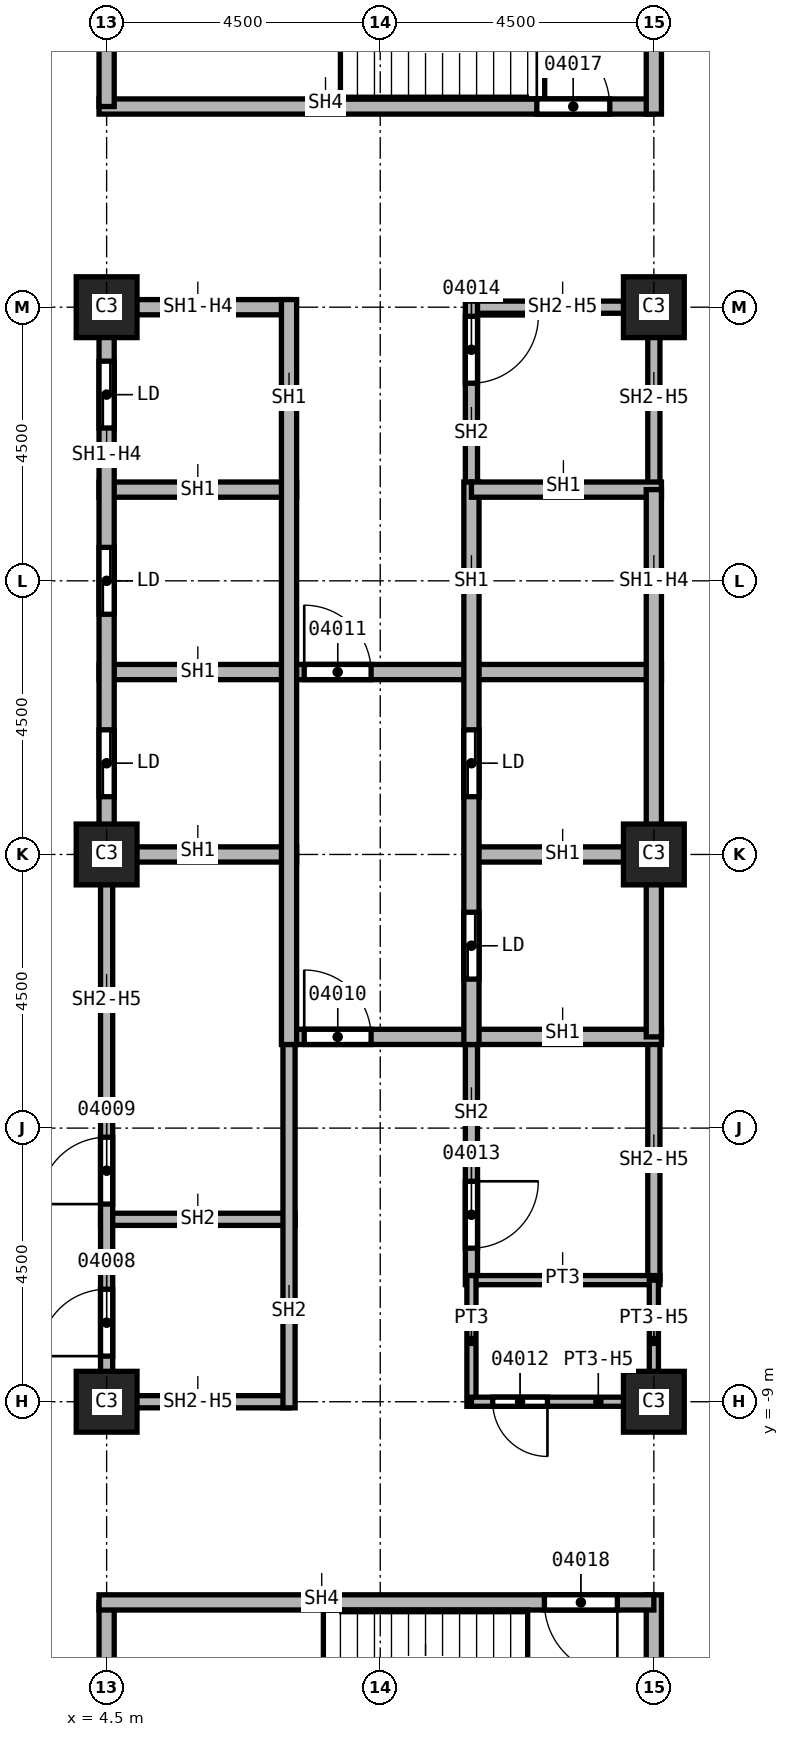
"""IFC4 building model, lengths in metres.
Left out: names, types, materials, properties, quantities, classifications, styles, units other than length and angle.
Written with IfcOpenShell. Run it as: python <this file> out.ifc"""

import sys

from ifc_helpers import new_model, si_unit, direction, frame, frame_2d, origin, origin_2d, place, context, subcontext, project, spatial, rectangle, extrude, element, fill, save


model = new_model("IFC4")
c1 = context("Model", 3, precision=1e-05, world=origin(), true_north=direction((0.0, 1.0)))
c2 = subcontext(c1, "Body", "Model", "MODEL_VIEW")
j1 = project(units=[si_unit("LENGTHUNIT", "METRE"), si_unit("PLANEANGLEUNIT", "RADIAN")], contexts=[c1])
p1 = place(None, origin())
s1 = spatial("IfcSite", under=j1, at=p1, CompositionType="ELEMENT")
p2 = place(p1, origin())
s2 = spatial("IfcBuilding", under=s1, at=p2, CompositionType="ELEMENT")
p3 = place(p2, frame((0.0, 0.0, 108.0)))
s3 = spatial("IfcBuildingStorey", under=s2, at=p3, CompositionType="ELEMENT", Elevation=108.0)
for number, where, z_axis, x_axis in (
    (1, (4.5, 0.0, 0.0), (0.0, 0.0, 1.0), (1.0, 0.0, 0.0)),
    (2, (4.5, 9.0, 0.0), (0.0, 0.0, 1.0), (1.0, 0.0, 0.0)),
    (3, (4.5, -9.0, 0.0), (0.0, 0.0, 1.0), (1.0, 0.0, 0.0)),
    (4, (13.5, 0.0, 0.0), (0.0, 0.0, 1.0), (1.0, 0.0, 0.0)),
    (5, (13.5, 9.0, 0.0), (0.0, 0.0, 1.0), (1.0, 0.0, 0.0)),
    (6, (13.5, -9.0, 0.0), (0.0, 0.0, 1.0), (1.0, 0.0, 0.0)),
):
    element("IfcColumn", number, at=place(p3, frame(where, z_axis=z_axis, x_axis=x_axis)), inside=s3, PredefinedType="COLUMN", context=c2, shape_type="SweptSolid", body=[
        extrude(rectangle(XDim=1.0, YDim=1.0, at=origin_2d()), origin(), (0.0, 0.0, 1.0), 3.7),
    ])
p4 = place(p3, frame((4.4, -6.0, 0.0), z_axis=(0.0, 0.0, 1.0), x_axis=(1.0, 0.0, 0.0)))
e7 = element("IfcWall", 7, at=p4, inside=s3, PredefinedType="SOLIDWALL", context=c2, shape_type="SweptSolid", body=[
    extrude(rectangle(XDim=3.2, YDim=0.2, at=frame_2d((1.6, 0.0))), origin(), (0.0, 0.0, 1.0), 3.7),
])
p5 = place(p3, frame((4.5, -9.1, 0.0), z_axis=(0.0, 0.0, 1.0), x_axis=(0.0, 1.0, 0.0)))
e8 = element("IfcWall", 8, at=p5, inside=s3, PredefinedType="SOLIDWALL", context=c2, shape_type="SweptSolid", body=[
    extrude(rectangle(XDim=9.1, YDim=0.2, at=frame_2d((4.55, 0.0))), origin(), (0.0, 0.0, 1.0), 2.938),
])
p6 = place(p5, frame((0.85, 0.0, 0.0)))
e9 = element("IfcOpeningElement", 9, at=p6, cuts=e8, PredefinedType="OPENING", context=c2, shape_type="SweptSolid", body=[
    extrude(rectangle(XDim=1.1, YDim=2.1, at=frame_2d((0.55, 1.05))), frame((0.0, 0.1, 0.0), z_axis=(0.0, -1.0, 0.0), x_axis=(1.0, 0.0, 0.0)), (0.0, 0.0, 1.0), 0.2),
])
p7 = place(p5, frame((3.35, 0.0, 0.0)))
e10 = element("IfcOpeningElement", 10, at=p7, cuts=e8, PredefinedType="OPENING", context=c2, shape_type="SweptSolid", body=[
    extrude(rectangle(XDim=1.1, YDim=2.1, at=frame_2d((0.55, 1.05))), frame((0.0, 0.1, 0.0), z_axis=(0.0, -1.0, 0.0), x_axis=(1.0, 0.0, 0.0)), (0.0, 0.0, 1.0), 0.2),
])
p8 = place(p3, frame((7.5, -9.0, 0.0), z_axis=(0.0, 0.0, 1.0), x_axis=(-1.0, 0.0, 0.0)))
e11 = element("IfcWall", 11, at=p8, inside=s3, PredefinedType="SOLIDWALL", context=c2, shape_type="SweptSolid", body=[
    extrude(rectangle(XDim=3.0, YDim=0.2, at=frame_2d((1.5, 0.0))), origin(), (0.0, 0.0, 1.0), 2.938),
])
p9 = place(p3, frame((7.5, -2.875, 0.0), z_axis=(0.0, 0.0, 1.0), x_axis=(0.0, -1.0, 0.0)))
e12 = element("IfcWall", 12, at=p9, inside=s3, PredefinedType="SOLIDWALL", context=c2, shape_type="SweptSolid", body=[
    extrude(rectangle(XDim=6.225, YDim=0.2, at=frame_2d((3.113, 0.0))), origin(), (0.0, 0.0, 1.0), 3.7),
])
p10 = place(p3, frame((10.5, -2.875, 0.0), z_axis=(0.0, 0.0, 1.0), x_axis=(0.0, -1.0, 0.0)))
e13 = element("IfcWall", 13, at=p10, inside=s3, PredefinedType="SOLIDWALL", context=c2, shape_type="SweptSolid", body=[
    extrude(rectangle(XDim=4.2, YDim=0.2, at=frame_2d((2.1, 0.0))), origin(), (0.0, 0.0, 1.0), 3.7),
])
p11 = place(p10, frame((2.5, 0.0, 0.0)))
e14 = element("IfcOpeningElement", 14, at=p11, cuts=e13, PredefinedType="OPENING", context=c2, shape_type="SweptSolid", body=[
    extrude(rectangle(XDim=1.1, YDim=2.1, at=frame_2d((0.55, 1.05))), frame((0.0, 0.1, 0.0), z_axis=(0.0, -1.0, 0.0), x_axis=(1.0, 0.0, 0.0)), (0.0, 0.0, 1.0), 0.2),
])
p12 = place(p3, frame((10.5, 9.0, 0.0), z_axis=(0.0, 0.0, 1.0), x_axis=(1.0, 0.0, 0.0)))
e15 = element("IfcWall", 15, at=p12, inside=s3, PredefinedType="SOLIDWALL", context=c2, shape_type="SweptSolid", body=[
    extrude(rectangle(XDim=3.0, YDim=0.2, at=frame_2d((1.5, 0.0))), origin(), (0.0, 0.0, 1.0), 2.938),
])
p13 = place(p3, frame((10.5, 9.1, 0.0), z_axis=(0.0, 0.0, 1.0), x_axis=(0.0, -1.0, 0.0)))
e16 = element("IfcWall", 16, at=p13, inside=s3, PredefinedType="SOLIDWALL", context=c2, shape_type="SweptSolid", body=[
    extrude(rectangle(XDim=3.225, YDim=0.2, at=frame_2d((1.613, 0.0))), origin(), (0.0, 0.0, 1.0), 3.7),
])
p14 = place(p13, frame((0.25, 0.0, 0.0)))
e17 = element("IfcOpeningElement", 17, at=p14, cuts=e16, PredefinedType="OPENING", context=c2, shape_type="SweptSolid", body=[
    extrude(rectangle(XDim=1.1, YDim=2.1, at=frame_2d((0.55, 1.05))), frame((0.0, 0.1, 0.0), z_axis=(0.0, -1.0, 0.0), x_axis=(1.0, 0.0, 0.0)), (0.0, 0.0, 1.0), 0.2),
])
p15 = place(p3, frame((13.5, -3.0, 0.0), z_axis=(0.0, 0.0, 1.0), x_axis=(0.0, -1.0, 0.0)))
e18 = element("IfcWall", 18, at=p15, inside=s3, PredefinedType="SOLIDWALL", context=c2, shape_type="SweptSolid", body=[
    extrude(rectangle(XDim=4.0, YDim=0.2, at=frame_2d((2.0, 0.0))), origin(), (0.0, 0.0, 1.0), 2.938),
])
p16 = place(p3, frame((13.5, 9.1, 0.0), z_axis=(0.0, 0.0, 1.0), x_axis=(0.0, -1.0, 0.0)))
e19 = element("IfcWall", 19, at=p16, inside=s3, PredefinedType="SOLIDWALL", context=c2, shape_type="SweptSolid", body=[
    extrude(rectangle(XDim=3.1, YDim=0.2, at=frame_2d((1.55, 0.0))), origin(), (0.0, 0.0, 1.0), 2.938),
])
p17 = place(p3, frame((4.375, 0.0, 0.0), z_axis=(0.0, 0.0, 1.0), x_axis=(1.0, 0.0, 0.0)))
e20 = element("IfcWall", 20, at=p17, inside=s3, PredefinedType="SOLIDWALL", context=c2, shape_type="SweptSolid", body=[
    extrude(rectangle(XDim=3.25, YDim=0.25, at=frame_2d((1.625, 0.0))), origin(), (0.0, 0.0, 1.0), 3.7),
])
p18 = place(p3, frame((4.375, 3.0, 0.0), z_axis=(0.0, 0.0, 1.0), x_axis=(1.0, 0.0, 0.0)))
e21 = element("IfcWall", 21, at=p18, inside=s3, PredefinedType="SOLIDWALL", context=c2, shape_type="SweptSolid", body=[
    extrude(rectangle(XDim=9.25, YDim=0.25, at=frame_2d((4.625, 0.0))), origin(), (0.0, 0.0, 1.0), 3.7),
])
p19 = place(p18, frame((3.375, 0.0, 0.0)))
e22 = element("IfcOpeningElement", 22, at=p19, cuts=e21, PredefinedType="OPENING", context=c2, shape_type="SweptSolid", body=[
    extrude(rectangle(XDim=1.1, YDim=2.1, at=frame_2d((0.55, 1.05))), frame((0.0, 0.125, 0.0), z_axis=(0.0, -1.0, 0.0), x_axis=(1.0, 0.0, 0.0)), (0.0, 0.0, 1.0), 0.25),
])
p20 = place(p3, frame((4.375, 6.0, 0.0), z_axis=(0.0, 0.0, 1.0), x_axis=(1.0, 0.0, 0.0)))
e23 = element("IfcWall", 23, at=p20, inside=s3, PredefinedType="SOLIDWALL", context=c2, shape_type="SweptSolid", body=[
    extrude(rectangle(XDim=3.25, YDim=0.25, at=frame_2d((1.625, 0.0))), origin(), (0.0, 0.0, 1.0), 3.7),
])
p21 = place(p3, frame((4.5, 0.0, 0.0), z_axis=(0.0, 0.0, 1.0), x_axis=(0.0, 1.0, 0.0)))
e24 = element("IfcWall", 24, at=p21, inside=s3, PredefinedType="SOLIDWALL", context=c2, shape_type="SweptSolid", body=[
    extrude(rectangle(XDim=9.125, YDim=0.25, at=frame_2d((4.562, 0.0))), origin(), (0.0, 0.0, 1.0), 2.938),
])
p22 = place(p21, frame((0.95, 0.0, 0.0)))
e25 = element("IfcOpeningElement", 25, at=p22, cuts=e24, PredefinedType="OPENING", context=c2, shape_type="SweptSolid", body=[
    extrude(rectangle(XDim=1.1, YDim=2.1, at=frame_2d((0.55, 1.05))), frame((0.0, 0.125, 0.0), z_axis=(0.0, -1.0, 0.0), x_axis=(1.0, 0.0, 0.0)), (0.0, 0.0, 1.0), 0.25),
])
p23 = place(p21, frame((3.95, 0.0, 0.0)))
e26 = element("IfcOpeningElement", 26, at=p23, cuts=e24, PredefinedType="OPENING", context=c2, shape_type="SweptSolid", body=[
    extrude(rectangle(XDim=1.1, YDim=2.1, at=frame_2d((0.55, 1.05))), frame((0.0, 0.125, 0.0), z_axis=(0.0, -1.0, 0.0), x_axis=(1.0, 0.0, 0.0)), (0.0, 0.0, 1.0), 0.25),
])
p24 = place(p21, frame((7.012, 0.0, 0.0)))
e27 = element("IfcOpeningElement", 27, at=p24, cuts=e24, PredefinedType="OPENING", context=c2, shape_type="SweptSolid", body=[
    extrude(rectangle(XDim=1.1, YDim=2.1, at=frame_2d((0.55, 1.05))), frame((0.0, 0.125, 0.0), z_axis=(0.0, -1.0, 0.0), x_axis=(1.0, 0.0, 0.0)), (0.0, 0.0, 1.0), 0.25),
])
p25 = place(p3, frame((4.5, 9.0, 0.0), z_axis=(0.0, 0.0, 1.0), x_axis=(1.0, 0.0, 0.0)))
e28 = element("IfcWall", 28, at=p25, inside=s3, PredefinedType="SOLIDWALL", context=c2, shape_type="SweptSolid", body=[
    extrude(rectangle(XDim=3.0, YDim=0.25, at=frame_2d((1.5, 0.0))), origin(), (0.0, 0.0, 1.0), 2.938),
])
p26 = place(p3, frame((7.5, -3.0, 0.0), z_axis=(0.0, 0.0, 1.0), x_axis=(1.0, 0.0, 0.0)))
e29 = element("IfcWall", 29, at=p26, inside=s3, PredefinedType="SOLIDWALL", context=c2, shape_type="SweptSolid", body=[
    extrude(rectangle(XDim=6.125, YDim=0.25, at=frame_2d((3.062, 0.0))), origin(), (0.0, 0.0, 1.0), 3.7),
])
p27 = place(p26, frame((0.25, 0.0, 0.0)))
e30 = element("IfcOpeningElement", 30, at=p27, cuts=e29, PredefinedType="OPENING", context=c2, shape_type="SweptSolid", body=[
    extrude(rectangle(XDim=1.1, YDim=2.1, at=frame_2d((0.55, 1.05))), frame((0.0, 0.125, 0.0), z_axis=(0.0, -1.0, 0.0), x_axis=(1.0, 0.0, 0.0)), (0.0, 0.0, 1.0), 0.25),
])
p28 = place(p3, frame((7.5, 9.125, 0.0), z_axis=(0.0, 0.0, 1.0), x_axis=(0.0, -1.0, 0.0)))
e31 = element("IfcWall", 31, at=p28, inside=s3, PredefinedType="SOLIDWALL", context=c2, shape_type="SweptSolid", body=[
    extrude(rectangle(XDim=12.25, YDim=0.25, at=frame_2d((6.125, 0.0))), origin(), (0.0, 0.0, 1.0), 3.7),
])
p29 = place(p3, frame((10.5, 0.0, 0.0), z_axis=(0.0, 0.0, 1.0), x_axis=(1.0, 0.0, 0.0)))
e32 = element("IfcWall", 32, at=p29, inside=s3, PredefinedType="SOLIDWALL", context=c2, shape_type="SweptSolid", body=[
    extrude(rectangle(XDim=3.125, YDim=0.25, at=frame_2d((1.562, 0.0))), origin(), (0.0, 0.0, 1.0), 3.7),
])
p30 = place(p3, frame((10.5, 6.125, 0.0), z_axis=(0.0, 0.0, 1.0), x_axis=(0.0, -1.0, 0.0)))
e33 = element("IfcWall", 33, at=p30, inside=s3, PredefinedType="SOLIDWALL", context=c2, shape_type="SweptSolid", body=[
    extrude(rectangle(XDim=9.25, YDim=0.25, at=frame_2d((4.625, 0.0))), origin(), (0.0, 0.0, 1.0), 3.7),
])
p31 = place(p30, frame((7.075, 0.0, 0.0)))
e34 = element("IfcOpeningElement", 34, at=p31, cuts=e33, PredefinedType="OPENING", context=c2, shape_type="SweptSolid", body=[
    extrude(rectangle(XDim=1.1, YDim=2.1, at=frame_2d((0.55, 1.05))), frame((0.0, 0.125, 0.0), z_axis=(0.0, -1.0, 0.0), x_axis=(1.0, 0.0, 0.0)), (0.0, 0.0, 1.0), 0.25),
])
p32 = place(p30, frame((4.075, 0.0, 0.0)))
e35 = element("IfcOpeningElement", 35, at=p32, cuts=e33, PredefinedType="OPENING", context=c2, shape_type="SweptSolid", body=[
    extrude(rectangle(XDim=1.1, YDim=2.1, at=frame_2d((0.55, 1.05))), frame((0.0, 0.125, 0.0), z_axis=(0.0, -1.0, 0.0), x_axis=(1.0, 0.0, 0.0)), (0.0, 0.0, 1.0), 0.25),
])
p33 = place(p3, frame((10.5, 6.0, 0.0), z_axis=(0.0, 0.0, 1.0), x_axis=(1.0, 0.0, 0.0)))
e36 = element("IfcWall", 36, at=p33, inside=s3, PredefinedType="SOLIDWALL", context=c2, shape_type="SweptSolid", body=[
    extrude(rectangle(XDim=3.125, YDim=0.25, at=frame_2d((1.562, 0.0))), origin(), (0.0, 0.0, 1.0), 3.7),
])
p34 = place(p3, frame((13.5, 6.0, 0.0), z_axis=(0.0, 0.0, 1.0), x_axis=(0.0, -1.0, 0.0)))
e37 = element("IfcWall", 37, at=p34, inside=s3, PredefinedType="SOLIDWALL", context=c2, shape_type="SweptSolid", body=[
    extrude(rectangle(XDim=9.0, YDim=0.25, at=frame_2d((4.5, 0.0))), origin(), (0.0, 0.0, 1.0), 2.938),
])
p35 = place(p3, frame((4.375, 12.3, 0.0), z_axis=(0.0, 0.0, 1.0), x_axis=(1.0, 0.0, 0.0)))
e38 = element("IfcWall", 38, at=p35, inside=s3, PredefinedType="SOLIDWALL", context=c2, shape_type="SweptSolid", body=[
    extrude(rectangle(XDim=9.125, YDim=0.25, at=frame_2d((4.562, 0.0))), origin(), (0.0, 0.0, 1.0), 3.7),
])
p36 = place(p35, frame((7.2, 0.0, 0.0)))
e39 = element("IfcOpeningElement", 39, at=p36, cuts=e38, PredefinedType="OPENING", context=c2, shape_type="SweptSolid", body=[
    extrude(rectangle(XDim=1.2, YDim=2.1, at=frame_2d((0.6, 1.05))), frame((0.0, 0.125, 0.0), z_axis=(0.0, -1.0, 0.0), x_axis=(1.0, 0.0, 0.0)), (0.0, 0.0, 1.0), 0.25),
])
for number, where, z_axis, x_axis in (
    (40, (4.5, -16.8, 0.0), (0.0, 0.0, 1.0), (0.0, 1.0, 0.0)),
    (41, (4.5, 12.3, 0.0), (0.0, 0.0, 1.0), (0.0, 1.0, 0.0)),
):
    element("IfcWall", number, at=place(p3, frame(where, z_axis=z_axis, x_axis=x_axis)), inside=s3, PredefinedType="SOLIDWALL", context=c2, shape_type="SweptSolid", body=[
        extrude(rectangle(XDim=4.5, YDim=0.25, at=frame_2d((2.25, 0.0))), origin(), (0.0, 0.0, 1.0), 3.7),
    ])
p37 = place(p3, frame((13.5, -16.925, 0.0), z_axis=(0.0, 0.0, 1.0), x_axis=(0.0, 1.0, 0.0)))
e42 = element("IfcWall", 42, at=p37, inside=s3, PredefinedType="SOLIDWALL", context=c2, shape_type="SweptSolid", body=[
    extrude(rectangle(XDim=4.75, YDim=0.25, at=frame_2d((2.375, 0.0))), origin(), (0.0, 0.0, 1.0), 3.7),
])
p38 = place(p3, frame((13.5, -12.3, 0.0), z_axis=(0.0, 0.0, 1.0), x_axis=(-1.0, 0.0, 0.0)))
e43 = element("IfcWall", 43, at=p38, inside=s3, PredefinedType="SOLIDWALL", context=c2, shape_type="SweptSolid", body=[
    extrude(rectangle(XDim=9.125, YDim=0.25, at=frame_2d((4.562, 0.0))), origin(), (0.0, 0.0, 1.0), 3.7),
])
p39 = place(p38, frame((0.6, 0.0, 0.0)))
e44 = element("IfcOpeningElement", 44, at=p39, cuts=e43, PredefinedType="OPENING", context=c2, shape_type="SweptSolid", body=[
    extrude(rectangle(XDim=1.2, YDim=2.1, at=frame_2d((0.6, 1.05))), frame((0.0, 0.125, 0.0), z_axis=(0.0, -1.0, 0.0), x_axis=(1.0, 0.0, 0.0)), (0.0, 0.0, 1.0), 0.25),
])
p40 = place(p3, frame((13.5, 12.175, 0.0), z_axis=(0.0, 0.0, 1.0), x_axis=(0.0, 1.0, 0.0)))
e45 = element("IfcWall", 45, at=p40, inside=s3, PredefinedType="SOLIDWALL", context=c2, shape_type="SweptSolid", body=[
    extrude(rectangle(XDim=4.75, YDim=0.25, at=frame_2d((2.375, 0.0))), origin(), (0.0, 0.0, 1.0), 3.7),
])
p41 = place(p3, frame((10.5, -7.0, 0.0), z_axis=(0.0, 0.0, 1.0), x_axis=(1.0, 0.0, 0.0)))
e46 = element("IfcWall", 46, at=p41, inside=s3, PredefinedType="PARTITIONING", context=c2, shape_type="SweptSolid", body=[
    extrude(rectangle(XDim=3.1, YDim=0.15, at=frame_2d((1.55, 0.0))), origin(), (0.0, 0.0, 1.0), 3.7),
])
p42 = place(p3, frame((10.5, -6.925, 0.0), z_axis=(0.0, 0.0, 1.0), x_axis=(0.0, -1.0, 0.0)))
e47 = element("IfcWall", 47, at=p42, inside=s3, PredefinedType="PARTITIONING", context=c2, shape_type="SweptSolid", body=[
    extrude(rectangle(XDim=2.15, YDim=0.15, at=frame_2d((1.075, 0.0))), origin(), (0.0, 0.0, 1.0), 3.7),
])
p43 = place(p3, frame((13.5, -9.0, 0.0), z_axis=(0.0, 0.0, 1.0), x_axis=(-1.0, 0.0, 0.0)))
e48 = element("IfcWall", 48, at=p43, inside=s3, PredefinedType="PARTITIONING", context=c2, shape_type="SweptSolid", body=[
    extrude(rectangle(XDim=3.0, YDim=0.15, at=frame_2d((1.5, 0.0))), origin(), (0.0, 0.0, 1.0), 2.938),
])
p44 = place(p43, frame((1.75, 0.0, 0.0)))
e49 = element("IfcOpeningElement", 49, at=p44, cuts=e48, PredefinedType="OPENING", context=c2, shape_type="SweptSolid", body=[
    extrude(rectangle(XDim=0.9, YDim=2.1, at=frame_2d((0.45, 1.05))), frame((0.0, 0.075, 0.0), z_axis=(0.0, -1.0, 0.0), x_axis=(1.0, 0.0, 0.0)), (0.0, 0.0, 1.0), 0.15),
])
p45 = place(p3, frame((13.5, -7.0, 0.0), z_axis=(0.0, 0.0, 1.0), x_axis=(0.0, -1.0, 0.0)))
e50 = element("IfcWall", 50, at=p45, inside=s3, PredefinedType="PARTITIONING", context=c2, shape_type="SweptSolid", body=[
    extrude(rectangle(XDim=2.075, YDim=0.15, at=frame_2d((1.038, 0.0))), origin(), (0.0, 0.0, 1.0), 2.938),
])
p46 = place(p6, origin())
e51 = element("IfcDoor", 51, at=p46, inside=s3, OperationType="SINGLE_SWING_LEFT", PredefinedType="DOOR", context=c2, shape_type="SweptSolid", body=[
    extrude(rectangle(XDim=1.1, YDim=2.1, at=frame_2d((0.55, 1.05))), frame((0.0, 0.025, 0.0), z_axis=(0.0, -1.0, 0.0), x_axis=(1.0, 0.0, 0.0)), (0.0, 0.0, 1.0), 0.05),
])
fill(e9, e51)
p47 = place(p7, origin())
e52 = element("IfcDoor", 52, at=p47, inside=s3, OperationType="SINGLE_SWING_RIGHT", PredefinedType="DOOR", context=c2, shape_type="SweptSolid", body=[
    extrude(rectangle(XDim=1.1, YDim=2.1, at=frame_2d((0.55, 1.05))), frame((0.0, 0.025, 0.0), z_axis=(0.0, -1.0, 0.0), x_axis=(1.0, 0.0, 0.0)), (0.0, 0.0, 1.0), 0.05),
])
fill(e10, e52)
p48 = place(p27, origin())
e53 = element("IfcDoor", 53, at=p48, inside=s3, OperationType="SINGLE_SWING_LEFT", PredefinedType="DOOR", context=c2, shape_type="SweptSolid", body=[
    extrude(rectangle(XDim=1.1, YDim=2.1, at=frame_2d((0.55, 1.05))), frame((0.0, 0.025, 0.0), z_axis=(0.0, -1.0, 0.0), x_axis=(1.0, 0.0, 0.0)), (0.0, 0.0, 1.0), 0.05),
])
fill(e30, e53)
p49 = place(p19, origin())
e54 = element("IfcDoor", 54, at=p49, inside=s3, OperationType="SINGLE_SWING_RIGHT", PredefinedType="DOOR", context=c2, shape_type="SweptSolid", body=[
    extrude(rectangle(XDim=1.1, YDim=2.1, at=frame_2d((0.55, 1.05))), frame((0.0, 0.025, 0.0), z_axis=(0.0, -1.0, 0.0), x_axis=(1.0, 0.0, 0.0)), (0.0, 0.0, 1.0), 0.05),
])
fill(e22, e54)
p50 = place(p44, origin())
e55 = element("IfcDoor", 55, at=p50, inside=s3, OperationType="SINGLE_SWING_LEFT", PredefinedType="DOOR", context=c2, shape_type="SweptSolid", body=[
    extrude(rectangle(XDim=0.9, YDim=2.1, at=frame_2d((0.45, 1.05))), frame((0.0, 0.025, 0.0), z_axis=(0.0, -1.0, 0.0), x_axis=(1.0, 0.0, 0.0)), (0.0, 0.0, 1.0), 0.05),
])
fill(e49, e55)
p51 = place(p11, origin())
e56 = element("IfcDoor", 56, at=p51, inside=s3, OperationType="SINGLE_SWING_RIGHT", PredefinedType="DOOR", context=c2, shape_type="SweptSolid", body=[
    extrude(rectangle(XDim=1.1, YDim=2.1, at=frame_2d((0.55, 1.05))), frame((0.0, 0.025, 0.0), z_axis=(0.0, -1.0, 0.0), x_axis=(1.0, 0.0, 0.0)), (0.0, 0.0, 1.0), 0.05),
])
fill(e14, e56)
p52 = place(p14, origin())
e57 = element("IfcDoor", 57, at=p52, inside=s3, OperationType="SINGLE_SWING_LEFT", PredefinedType="DOOR", context=c2, shape_type="SweptSolid", body=[
    extrude(rectangle(XDim=1.1, YDim=2.1, at=frame_2d((0.55, 1.05))), frame((0.0, 0.025, 0.0), z_axis=(0.0, -1.0, 0.0), x_axis=(1.0, 0.0, 0.0)), (0.0, 0.0, 1.0), 0.05),
])
fill(e17, e57)
p53 = place(p36, origin())
e58 = element("IfcDoor", 58, at=p53, inside=s3, OperationType="SINGLE_SWING_RIGHT", PredefinedType="DOOR", context=c2, shape_type="SweptSolid", body=[
    extrude(rectangle(XDim=1.2, YDim=2.1, at=frame_2d((0.6, 1.05))), frame((0.0, 0.025, 0.0), z_axis=(0.0, -1.0, 0.0), x_axis=(1.0, 0.0, 0.0)), (0.0, 0.0, 1.0), 0.05),
])
fill(e39, e58)
p54 = place(p39, origin())
e59 = element("IfcDoor", 59, at=p54, inside=s3, OperationType="SINGLE_SWING_LEFT", PredefinedType="DOOR", context=c2, shape_type="SweptSolid", body=[
    extrude(rectangle(XDim=1.2, YDim=2.1, at=frame_2d((0.6, 1.05))), frame((0.0, 0.025, 0.0), z_axis=(0.0, -1.0, 0.0), x_axis=(1.0, 0.0, 0.0)), (0.0, 0.0, 1.0), 0.05),
])
fill(e44, e59)
p55 = place(p22, origin())
e60 = element("IfcDoor", 60, at=p55, inside=s3, OperationType="SLIDING_TO_LEFT", PredefinedType="DOOR", context=c2, shape_type="SweptSolid", body=[
    extrude(rectangle(XDim=1.1, YDim=2.1, at=frame_2d((0.55, 1.05))), frame((0.0, 0.025, 0.0), z_axis=(0.0, -1.0, 0.0), x_axis=(1.0, 0.0, 0.0)), (0.0, 0.0, 1.0), 0.05),
])
fill(e25, e60)
p56 = place(p23, origin())
e61 = element("IfcDoor", 61, at=p56, inside=s3, OperationType="SLIDING_TO_LEFT", PredefinedType="DOOR", context=c2, shape_type="SweptSolid", body=[
    extrude(rectangle(XDim=1.1, YDim=2.1, at=frame_2d((0.55, 1.05))), frame((0.0, 0.025, 0.0), z_axis=(0.0, -1.0, 0.0), x_axis=(1.0, 0.0, 0.0)), (0.0, 0.0, 1.0), 0.05),
])
fill(e26, e61)
p57 = place(p24, origin())
e62 = element("IfcDoor", 62, at=p57, inside=s3, OperationType="SLIDING_TO_LEFT", PredefinedType="DOOR", context=c2, shape_type="SweptSolid", body=[
    extrude(rectangle(XDim=1.1, YDim=2.1, at=frame_2d((0.55, 1.05))), frame((0.0, 0.025, 0.0), z_axis=(0.0, -1.0, 0.0), x_axis=(1.0, 0.0, 0.0)), (0.0, 0.0, 1.0), 0.05),
])
fill(e27, e62)
p58 = place(p31, origin())
e63 = element("IfcDoor", 63, at=p58, inside=s3, OperationType="SLIDING_TO_LEFT", PredefinedType="DOOR", context=c2, shape_type="SweptSolid", body=[
    extrude(rectangle(XDim=1.1, YDim=2.1, at=frame_2d((0.55, 1.05))), frame((0.0, 0.025, 0.0), z_axis=(0.0, -1.0, 0.0), x_axis=(1.0, 0.0, 0.0)), (0.0, 0.0, 1.0), 0.05),
])
fill(e34, e63)
p59 = place(p32, origin())
e64 = element("IfcDoor", 64, at=p59, inside=s3, OperationType="SLIDING_TO_LEFT", PredefinedType="DOOR", context=c2, shape_type="SweptSolid", body=[
    extrude(rectangle(XDim=1.1, YDim=2.1, at=frame_2d((0.55, 1.05))), frame((0.0, 0.025, 0.0), z_axis=(0.0, -1.0, 0.0), x_axis=(1.0, 0.0, 0.0)), (0.0, 0.0, 1.0), 0.05),
])
fill(e35, e64)
save(model, sys.argv[1])
